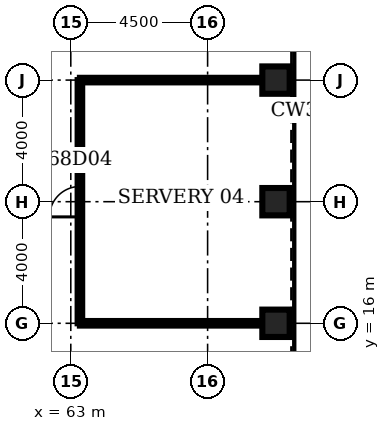
"""IFC4 building model, lengths in metres.
Left out: names, types, materials, properties, quantities, classifications, styles, units other than length and angle.
Written with IfcOpenShell. Run it as: python <this file> out.ifc"""

import sys

from ifc_helpers import new_model, si_unit, direction, frame, frame_2d, origin, origin_2d, place, context, subcontext, project, spatial, rectangle, hollow_rectangle, extrude, element, fill, save


model = new_model("IFC4")
c1 = context("Model", 3, precision=1e-05, world=origin(), true_north=direction((0.0, 1.0)))
c2 = subcontext(c1, "Body", "Model", "MODEL_VIEW")
j1 = project(units=[si_unit("LENGTHUNIT", "METRE"), si_unit("PLANEANGLEUNIT", "RADIAN")], contexts=[c1])
p1 = place(None, origin())
s1 = spatial("IfcSite", under=j1, at=p1, CompositionType="ELEMENT")
p2 = place(p1, origin())
s2 = spatial("IfcBuilding", under=s1, at=p2, CompositionType="ELEMENT")
p3 = place(p2, frame((0.0, 0.0, 300.5)))
s3 = spatial("IfcBuildingStorey", under=s2, at=p3, CompositionType="ELEMENT", Elevation=300.5)
for number, where, z_axis, x_axis in (
    (1, (69.75, 16.0, 0.0), (0.0, 0.0, 1.0), (1.0, 0.0, 0.0)),
    (2, (69.75, 20.0, 0.0), (0.0, 0.0, 1.0), (1.0, 0.0, 0.0)),
    (3, (69.75, 24.0, 0.0), (0.0, 0.0, 1.0), (1.0, 0.0, 0.0)),
):
    element("IfcColumn", number, at=place(p3, frame(where, z_axis=z_axis, x_axis=x_axis)), inside=s3, PredefinedType="COLUMN", context=c2, shape_type="SweptSolid", body=[
        extrude(hollow_rectangle(XDim=0.9, YDim=0.9, WallThickness=0.06, at=origin_2d()), origin(), (0.0, 0.0, 1.0), 4.2),
    ])
for number, where, z_axis, x_axis in (
    (4, (63.3, 16.0, 0.0), (0.0, 0.0, 1.0), (1.0, 0.0, 0.0)),
    (5, (63.3, 24.0, 0.0), (0.0, 0.0, 1.0), (1.0, 0.0, 0.0)),
):
    element("IfcWall", number, at=place(p3, frame(where, z_axis=z_axis, x_axis=x_axis)), inside=s3, PredefinedType="PARTITIONING", context=c2, shape_type="SweptSolid", body=[
        extrude(rectangle(XDim=6.0, YDim=0.15, at=frame_2d((3.0, 0.0))), origin(), (0.0, 0.0, 1.0), 3.0),
    ])
p4 = place(p3, frame((63.3, 16.0, 0.0), z_axis=(0.0, 0.0, 1.0), x_axis=(0.0, 1.0, 0.0)))
e6 = element("IfcWall", 6, at=p4, inside=s3, PredefinedType="PARTITIONING", context=c2, shape_type="SweptSolid", body=[
    extrude(rectangle(XDim=8.0, YDim=0.15, at=frame_2d((4.0, 0.0))), origin(), (0.0, 0.0, 1.0), 3.0),
])
p5 = place(p4, frame((3.5, 0.0, 0.0)))
e7 = element("IfcOpeningElement", 7, at=p5, cuts=e6, PredefinedType="OPENING", context=c2, shape_type="SweptSolid", body=[
    extrude(rectangle(XDim=1.0, YDim=2.1, at=frame_2d((0.5, 1.05))), frame((0.0, 0.085, 0.0), z_axis=(0.0, -1.0, 0.0), x_axis=(1.0, 0.0, 0.0)), (0.0, 0.0, 1.0), 0.17),
])
p6 = place(p5, origin())
e8 = element("IfcDoor", 8, at=p6, inside=s3, OperationType="SINGLE_SWING_LEFT", PredefinedType="DOOR", context=c2, shape_type="SweptSolid", body=[
    extrude(rectangle(XDim=1.0, YDim=2.1, at=frame_2d((0.5, 1.05))), frame((0.0, 0.025, 0.0), z_axis=(0.0, -1.0, 0.0), x_axis=(1.0, 0.0, 0.0)), (0.0, 0.0, 1.0), 0.05),
])
fill(e7, e8)
save(model, sys.argv[1])
